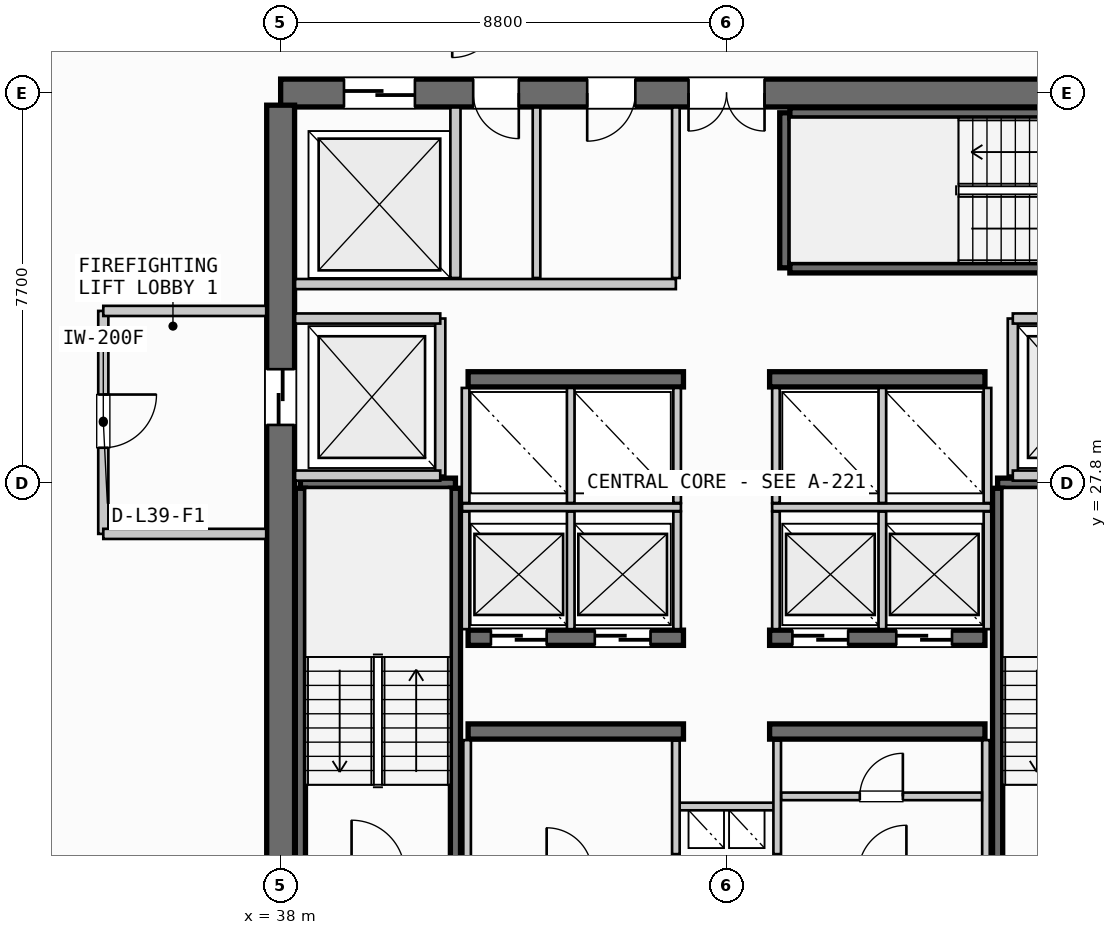
"""IFC4 building model, lengths in metres.
Left out: names, types, materials, properties, quantities, classifications, styles, units other than length and angle.
Written with IfcOpenShell. Run it as: python <this file> out.ifc"""

import sys

from ifc_helpers import new_model, si_unit, direction, frame, frame_2d, origin, place, context, subcontext, project, spatial, rectangle, extrude, source, transform, mapped, element, fill, save


model = new_model("IFC4")
c1 = context("Model", 3, precision=1e-05, world=origin(), true_north=direction((0.0, 1.0)))
c2 = subcontext(c1, "Body", "Model", "MODEL_VIEW")
j1 = project(units=[si_unit("LENGTHUNIT", "METRE"), si_unit("PLANEANGLEUNIT", "RADIAN")], contexts=[c1])
p1 = place(None, origin())
s1 = spatial("IfcSite", under=j1, at=p1, CompositionType="ELEMENT")
p2 = place(p1, origin())
s2 = spatial("IfcBuilding", under=s1, at=p2, CompositionType="ELEMENT")
p3 = place(p2, frame((0.0, 0.0, 153.65)))
s3 = spatial("IfcBuildingStorey", under=s2, at=p3, CompositionType="ELEMENT", Elevation=153.65)
p4 = place(p3, frame((55.6, 35.5, 0.0), z_axis=(0.0, 0.0, 1.0), x_axis=(-1.0, 0.0, 0.0)))
e1 = element("IfcWall", 1, at=p4, inside=s3, PredefinedType="SHEAR", context=c2, shape_type="SweptSolid", body=[
    extrude(rectangle(XDim=17.6, YDim=0.55, at=frame_2d((8.8, 0.0))), origin(), (0.0, 0.0, 1.0), 3.3),
])
p5 = place(p4, frame((8.05, 0.0, 0.0)))
e2 = element("IfcOpeningElement", 2, at=p5, cuts=e1, PredefinedType="OPENING", context=c2, shape_type="SweptSolid", body=[
    extrude(rectangle(XDim=1.5, YDim=2.2, at=frame_2d((0.75, 1.1))), frame((0.0, 0.285, 0.0), z_axis=(0.0, -1.0, 0.0), x_axis=(1.0, 0.0, 0.0)), (0.0, 0.0, 1.0), 0.57),
])
p6 = place(p4, frame((14.95, 0.0, 0.0)))
e3 = element("IfcOpeningElement", 3, at=p6, cuts=e1, PredefinedType="OPENING", context=c2, shape_type="SweptSolid", body=[
    extrude(rectangle(XDim=1.4, YDim=2.3, at=frame_2d((0.7, 1.15))), frame((0.0, 0.285, 0.0), z_axis=(0.0, -1.0, 0.0), x_axis=(1.0, 0.0, 0.0)), (0.0, 0.0, 1.0), 0.57),
])
p7 = place(p4, frame((12.9, 0.0, 0.0)))
e4 = element("IfcOpeningElement", 4, at=p7, cuts=e1, PredefinedType="OPENING", context=c2, shape_type="SweptSolid", body=[
    extrude(rectangle(XDim=0.9, YDim=2.15, at=frame_2d((0.45, 1.075))), frame((0.0, 0.285, 0.0), z_axis=(0.0, -1.0, 0.0), x_axis=(1.0, 0.0, 0.0)), (0.0, 0.0, 1.0), 0.57),
])
p8 = place(p4, frame((10.6, 0.0, 0.0)))
e5 = element("IfcOpeningElement", 5, at=p8, cuts=e1, PredefinedType="OPENING", context=c2, shape_type="SweptSolid", body=[
    extrude(rectangle(XDim=0.95, YDim=2.15, at=frame_2d((0.475, 1.075))), frame((0.0, 0.285, 0.0), z_axis=(0.0, -1.0, 0.0), x_axis=(1.0, 0.0, 0.0)), (0.0, 0.0, 1.0), 0.57),
])
p9 = place(p3, frame((38.0, 35.26, 0.0), z_axis=(0.0, 0.0, 1.0), x_axis=(0.0, -1.0, 0.0)))
e6 = element("IfcWall", 6, at=p9, inside=s3, PredefinedType="SHEAR", context=c2, shape_type="SweptSolid", body=[
    extrude(rectangle(XDim=14.92, YDim=0.55, at=frame_2d((7.46, 0.0))), origin(), (0.0, 0.0, 1.0), 3.3),
])
p10 = place(p9, frame((5.21, 0.0, 0.0)))
e7 = element("IfcOpeningElement", 7, at=p10, cuts=e6, PredefinedType="OPENING", context=c2, shape_type="SweptSolid", body=[
    extrude(rectangle(XDim=1.1, YDim=2.2, at=frame_2d((0.55, 1.1))), frame((0.0, 0.285, 0.0), z_axis=(0.0, -1.0, 0.0), x_axis=(1.0, 0.0, 0.0)), (0.0, 0.0, 1.0), 0.57),
])
for number, where, z_axis, x_axis in (
    (8, (41.7, 22.9, 0.0), (0.0, 0.0, 1.0), (1.0, 0.0, 0.0)),
    (9, (47.65, 22.9, 0.0), (0.0, 0.0, 1.0), (1.0, 0.0, 0.0)),
):
    element("IfcWall", number, at=place(p3, frame(where, z_axis=z_axis, x_axis=x_axis)), inside=s3, PredefinedType="SHEAR", context=c2, shape_type="SweptSolid", body=[
        extrude(rectangle(XDim=4.25, YDim=0.3, at=frame_2d((2.125, 0.0))), origin(), (0.0, 0.0, 1.0), 3.3),
    ])
p11 = place(p3, frame((41.7, 24.75, 0.0), z_axis=(0.0, 0.0, 1.0), x_axis=(1.0, 0.0, 0.0)))
e10 = element("IfcWall", 10, at=p11, inside=s3, PredefinedType="SHEAR", context=c2, shape_type="SweptSolid", body=[
    extrude(rectangle(XDim=4.25, YDim=0.3, at=frame_2d((2.125, 0.0))), origin(), (0.0, 0.0, 1.0), 3.3),
])
p12 = place(p11, frame((0.45, 0.0, 0.0)))
e11 = element("IfcOpeningElement", 11, at=p12, cuts=e10, PredefinedType="OPENING", context=c2, shape_type="SweptSolid", body=[
    extrude(rectangle(XDim=1.1, YDim=2.2, at=frame_2d((0.55, 1.1))), frame((0.0, 0.16, 0.0), z_axis=(0.0, -1.0, 0.0), x_axis=(1.0, 0.0, 0.0)), (0.0, 0.0, 1.0), 0.32),
])
p13 = place(p11, frame((2.5, 0.0, 0.0)))
e12 = element("IfcOpeningElement", 12, at=p13, cuts=e10, PredefinedType="OPENING", context=c2, shape_type="SweptSolid", body=[
    extrude(rectangle(XDim=1.1, YDim=2.2, at=frame_2d((0.55, 1.1))), frame((0.0, 0.16, 0.0), z_axis=(0.0, -1.0, 0.0), x_axis=(1.0, 0.0, 0.0)), (0.0, 0.0, 1.0), 0.32),
])
p14 = place(p3, frame((47.65, 24.75, 0.0), z_axis=(0.0, 0.0, 1.0), x_axis=(1.0, 0.0, 0.0)))
e13 = element("IfcWall", 13, at=p14, inside=s3, PredefinedType="SHEAR", context=c2, shape_type="SweptSolid", body=[
    extrude(rectangle(XDim=4.25, YDim=0.3, at=frame_2d((2.125, 0.0))), origin(), (0.0, 0.0, 1.0), 3.3),
])
p15 = place(p14, frame((0.45, 0.0, 0.0)))
e14 = element("IfcOpeningElement", 14, at=p15, cuts=e13, PredefinedType="OPENING", context=c2, shape_type="SweptSolid", body=[
    extrude(rectangle(XDim=1.1, YDim=2.2, at=frame_2d((0.55, 1.1))), frame((0.0, 0.16, 0.0), z_axis=(0.0, -1.0, 0.0), x_axis=(1.0, 0.0, 0.0)), (0.0, 0.0, 1.0), 0.32),
])
p16 = place(p14, frame((2.5, 0.0, 0.0)))
e15 = element("IfcOpeningElement", 15, at=p16, cuts=e13, PredefinedType="OPENING", context=c2, shape_type="SweptSolid", body=[
    extrude(rectangle(XDim=1.1, YDim=2.2, at=frame_2d((0.55, 1.1))), frame((0.0, 0.16, 0.0), z_axis=(0.0, -1.0, 0.0), x_axis=(1.0, 0.0, 0.0)), (0.0, 0.0, 1.0), 0.32),
])
for number, where, z_axis, x_axis in (
    (16, (41.7, 29.85, 0.0), (0.0, 0.0, 1.0), (1.0, 0.0, 0.0)),
    (17, (47.65, 29.85, 0.0), (0.0, 0.0, 1.0), (1.0, 0.0, 0.0)),
):
    element("IfcWall", number, at=place(p3, frame(where, z_axis=z_axis, x_axis=x_axis)), inside=s3, PredefinedType="SHEAR", context=c2, shape_type="SweptSolid", body=[
        extrude(rectangle(XDim=4.25, YDim=0.3, at=frame_2d((2.125, 0.0))), origin(), (0.0, 0.0, 1.0), 3.3),
    ])
p17 = place(p3, frame((38.39, 27.8, 0.0), z_axis=(0.0, 0.0, 1.0), x_axis=(1.0, 0.0, 0.0)))
e18 = element("IfcWall", 18, at=p17, inside=s3, PredefinedType="SHEAR", context=c2, shape_type="SweptSolid", body=[
    extrude(rectangle(XDim=3.06, YDim=0.2, at=frame_2d((1.53, 0.0))), origin(), (0.0, 0.0, 1.0), 3.3),
])
for number, where, z_axis, x_axis in (
    (19, (41.45, 27.7, 0.0), (0.0, 0.0, 1.0), (0.0, -1.0, 0.0)),
    (20, (38.39, 20.35, 0.0), (0.0, 0.0, 1.0), (0.0, 1.0, 0.0)),
):
    element("IfcWall", number, at=place(p3, frame(where, z_axis=z_axis, x_axis=x_axis)), inside=s3, PredefinedType="SHEAR", context=c2, shape_type="SweptSolid", body=[
        extrude(rectangle(XDim=7.35, YDim=0.2, at=frame_2d((3.675, 0.0))), origin(), (0.0, 0.0, 1.0), 3.3),
    ])
p18 = place(p3, frame((52.15, 27.8, 0.0), z_axis=(0.0, 0.0, 1.0), x_axis=(1.0, 0.0, 0.0)))
e21 = element("IfcWall", 21, at=p18, inside=s3, PredefinedType="SHEAR", context=c2, shape_type="SweptSolid", body=[
    extrude(rectangle(XDim=3.06, YDim=0.2, at=frame_2d((1.53, 0.0))), origin(), (0.0, 0.0, 1.0), 3.3),
])
p19 = place(p3, frame((52.15, 20.35, 0.0), z_axis=(0.0, 0.0, 1.0), x_axis=(0.0, 1.0, 0.0)))
e22 = element("IfcWall", 22, at=p19, inside=s3, PredefinedType="SHEAR", context=c2, shape_type="SweptSolid", body=[
    extrude(rectangle(XDim=7.35, YDim=0.2, at=frame_2d((3.675, 0.0))), origin(), (0.0, 0.0, 1.0), 3.3),
])
p20 = place(p3, frame((47.95, 32.05, 0.0), z_axis=(0.0, 0.0, 1.0), x_axis=(0.0, 1.0, 0.0)))
e23 = element("IfcWall", 23, at=p20, inside=s3, PredefinedType="SHEAR", context=c2, shape_type="SweptSolid", body=[
    extrude(rectangle(XDim=3.06, YDim=0.2, at=frame_2d((1.53, 0.0))), origin(), (0.0, 0.0, 1.0), 3.3),
])
for number, where, z_axis, x_axis in (
    (24, (48.05, 35.11, 0.0), (0.0, 0.0, 1.0), (1.0, 0.0, 0.0)),
    (25, (55.4, 32.05, 0.0), (0.0, 0.0, 1.0), (-1.0, 0.0, 0.0)),
):
    element("IfcWall", number, at=place(p3, frame(where, z_axis=z_axis, x_axis=x_axis)), inside=s3, PredefinedType="SHEAR", context=c2, shape_type="SweptSolid", body=[
        extrude(rectangle(XDim=7.35, YDim=0.2, at=frame_2d((3.675, 0.0))), origin(), (0.0, 0.0, 1.0), 3.3),
    ])
p21 = place(p3, frame((45.8, 21.42, 0.0), z_axis=(0.0, 0.0, 1.0), x_axis=(1.0, 0.0, 0.0)))
e26 = element("IfcWall", 26, at=p21, inside=s3, PredefinedType="PARTITIONING", context=c2, shape_type="SweptSolid", body=[
    extrude(rectangle(XDim=2.0, YDim=0.15, at=frame_2d((1.0, 0.0))), origin(), (0.0, 0.0, 1.0), 2.28),
])
for number, where, z_axis, x_axis in (
    (27, (45.8, 20.48, 0.0), (0.0, 0.0, 1.0), (0.0, 1.0, 0.0)),
    (28, (47.8, 20.48, 0.0), (0.0, 0.0, 1.0), (0.0, 1.0, 0.0)),
):
    element("IfcWall", number, at=place(p3, frame(where, z_axis=z_axis, x_axis=x_axis)), inside=s3, PredefinedType="PARTITIONING", context=c2, shape_type="SweptSolid", body=[
        extrude(rectangle(XDim=2.24, YDim=0.15, at=frame_2d((1.12, 0.0))), origin(), (0.0, 0.0, 1.0), 2.28),
    ])
p22 = place(p3, frame((41.15, 27.95, 0.0), z_axis=(0.0, 0.0, 1.0), x_axis=(0.0, 1.0, 0.0)))
e29 = element("IfcWall", 29, at=p22, inside=s3, PredefinedType="PARTITIONING", context=c2, shape_type="SweptSolid", body=[
    extrude(rectangle(XDim=3.1, YDim=0.2, at=frame_2d((1.55, 0.0))), origin(), (0.0, 0.0, 1.0), 2.28),
])
for number, where, z_axis, x_axis in (
    (30, (38.285, 27.95, 0.0), (0.0, 0.0, 1.0), (1.0, 0.0, 0.0)),
    (31, (38.285, 31.05, 0.0), (0.0, 0.0, 1.0), (1.0, 0.0, 0.0)),
):
    element("IfcWall", number, at=place(p3, frame(where, z_axis=z_axis, x_axis=x_axis)), inside=s3, PredefinedType="PARTITIONING", context=c2, shape_type="SweptSolid", body=[
        extrude(rectangle(XDim=2.865, YDim=0.2, at=frame_2d((1.433, 0.0))), origin(), (0.0, 0.0, 1.0), 2.28),
    ])
p23 = place(p3, frame((34.5, 31.2, 0.0), z_axis=(0.0, 0.0, 1.0), x_axis=(0.0, -1.0, 0.0)))
e32 = element("IfcWall", 32, at=p23, inside=s3, PredefinedType="PARTITIONING", context=c2, shape_type="SweptSolid", body=[
    extrude(rectangle(XDim=4.4, YDim=0.2, at=frame_2d((2.2, 0.0))), origin(), (0.0, 0.0, 1.0), 2.28),
])
p24 = place(p23, frame((1.65, 0.0, 0.0)))
e33 = element("IfcOpeningElement", 33, at=p24, cuts=e32, PredefinedType="OPENING", context=c2, shape_type="SweptSolid", body=[
    extrude(rectangle(XDim=1.05, YDim=2.15, at=frame_2d((0.525, 1.075))), frame((0.0, 0.11, 0.0), z_axis=(0.0, -1.0, 0.0), x_axis=(1.0, 0.0, 0.0)), (0.0, 0.0, 1.0), 0.22),
])
for number, where, z_axis, x_axis in (
    (34, (34.5, 26.8, 0.0), (0.0, 0.0, 1.0), (1.0, 0.0, 0.0)),
    (35, (34.5, 31.2, 0.0), (0.0, 0.0, 1.0), (1.0, 0.0, 0.0)),
):
    element("IfcWall", number, at=place(p3, frame(where, z_axis=z_axis, x_axis=x_axis)), inside=s3, PredefinedType="PARTITIONING", context=c2, shape_type="SweptSolid", body=[
        extrude(rectangle(XDim=3.215, YDim=0.2, at=frame_2d((1.607, 0.0))), origin(), (0.0, 0.0, 1.0), 2.28),
    ])
p25 = place(p3, frame((52.45, 27.95, 0.0), z_axis=(0.0, 0.0, 1.0), x_axis=(0.0, 1.0, 0.0)))
e36 = element("IfcWall", 36, at=p25, inside=s3, PredefinedType="PARTITIONING", context=c2, shape_type="SweptSolid", body=[
    extrude(rectangle(XDim=3.1, YDim=0.2, at=frame_2d((1.55, 0.0))), origin(), (0.0, 0.0, 1.0), 2.28),
])
for number, where, z_axis, x_axis in (
    (37, (52.45, 27.95, 0.0), (0.0, 0.0, 1.0), (1.0, 0.0, 0.0)),
    (38, (52.45, 31.05, 0.0), (0.0, 0.0, 1.0), (1.0, 0.0, 0.0)),
):
    element("IfcWall", number, at=place(p3, frame(where, z_axis=z_axis, x_axis=x_axis)), inside=s3, PredefinedType="PARTITIONING", context=c2, shape_type="SweptSolid", body=[
        extrude(rectangle(XDim=2.865, YDim=0.2, at=frame_2d((1.433, 0.0))), origin(), (0.0, 0.0, 1.0), 2.28),
    ])
for number, where, z_axis, x_axis in (
    (39, (41.68, 20.385, 0.0), (0.0, 0.0, 1.0), (0.0, 1.0, 0.0)),
    (40, (51.92, 20.385, 0.0), (0.0, 0.0, 1.0), (0.0, 1.0, 0.0)),
):
    element("IfcWall", number, at=place(p3, frame(where, z_axis=z_axis, x_axis=x_axis)), inside=s3, PredefinedType="PARTITIONING", context=c2, shape_type="SweptSolid", body=[
        extrude(rectangle(XDim=2.345, YDim=0.15, at=frame_2d((1.172, 0.0))), origin(), (0.0, 0.0, 1.0), 2.28),
    ])
p26 = place(p3, frame((47.88, 21.62, 0.0), z_axis=(0.0, 0.0, 1.0), x_axis=(1.0, 0.0, 0.0)))
e41 = element("IfcWall", 41, at=p26, inside=s3, PredefinedType="PARTITIONING", context=c2, shape_type="SweptSolid", body=[
    extrude(rectangle(XDim=3.96, YDim=0.15, at=frame_2d((1.98, 0.0))), origin(), (0.0, 0.0, 1.0), 2.28),
])
p27 = place(p26, frame((1.55, 0.0, 0.0)))
e42 = element("IfcOpeningElement", 42, at=p27, cuts=e41, PredefinedType="OPENING", context=c2, shape_type="SweptSolid", body=[
    extrude(rectangle(XDim=0.85, YDim=2.15, at=frame_2d((0.425, 1.075))), frame((0.0, 0.085, 0.0), z_axis=(0.0, -1.0, 0.0), x_axis=(1.0, 0.0, 0.0)), (0.0, 0.0, 1.0), 0.17),
])
p28 = place(p3, frame((41.58, 27.325, 0.0), z_axis=(0.0, 0.0, 1.0), x_axis=(1.0, 0.0, 0.0)))
e43 = element("IfcWall", 43, at=p28, inside=s3, PredefinedType="PARTITIONING", context=c2, shape_type="SweptSolid", body=[
    extrude(rectangle(XDim=4.32, YDim=0.15, at=frame_2d((2.16, 0.0))), origin(), (0.0, 0.0, 1.0), 2.28),
])
p29 = place(p3, frame((47.7, 27.325, 0.0), z_axis=(0.0, 0.0, 1.0), x_axis=(1.0, 0.0, 0.0)))
e44 = element("IfcWall", 44, at=p29, inside=s3, PredefinedType="PARTITIONING", context=c2, shape_type="SweptSolid", body=[
    extrude(rectangle(XDim=4.32, YDim=0.15, at=frame_2d((2.16, 0.0))), origin(), (0.0, 0.0, 1.0), 2.28),
])
for number, where, z_axis, x_axis in (
    (45, (41.65, 24.92, 0.0), (0.0, 0.0, 1.0), (0.0, 1.0, 0.0)),
    (46, (43.725, 24.92, 0.0), (0.0, 0.0, 1.0), (0.0, 1.0, 0.0)),
    (47, (45.825, 24.92, 0.0), (0.0, 0.0, 1.0), (0.0, 1.0, 0.0)),
    (48, (47.775, 24.92, 0.0), (0.0, 0.0, 1.0), (0.0, 1.0, 0.0)),
    (49, (49.875, 24.92, 0.0), (0.0, 0.0, 1.0), (0.0, 1.0, 0.0)),
    (50, (51.95, 24.92, 0.0), (0.0, 0.0, 1.0), (0.0, 1.0, 0.0)),
):
    element("IfcWall", number, at=place(p3, frame(where, z_axis=z_axis, x_axis=x_axis)), inside=s3, PredefinedType="PARTITIONING", context=c2, shape_type="SweptSolid", body=[
        extrude(rectangle(XDim=2.32, YDim=0.15, at=frame_2d((1.16, 0.0))), origin(), (0.0, 0.0, 1.0), 2.28),
    ])
for number, where, z_axis, x_axis in (
    (51, (41.65, 27.41, 0.0), (0.0, 0.0, 1.0), (0.0, 1.0, 0.0)),
    (52, (43.725, 27.41, 0.0), (0.0, 0.0, 1.0), (0.0, 1.0, 0.0)),
    (53, (45.825, 27.41, 0.0), (0.0, 0.0, 1.0), (0.0, 1.0, 0.0)),
    (54, (47.775, 27.41, 0.0), (0.0, 0.0, 1.0), (0.0, 1.0, 0.0)),
    (55, (49.875, 27.41, 0.0), (0.0, 0.0, 1.0), (0.0, 1.0, 0.0)),
    (56, (51.95, 27.41, 0.0), (0.0, 0.0, 1.0), (0.0, 1.0, 0.0)),
):
    element("IfcWall", number, at=place(p3, frame(where, z_axis=z_axis, x_axis=x_axis)), inside=s3, PredefinedType="PARTITIONING", context=c2, shape_type="SweptSolid", body=[
        extrude(rectangle(XDim=2.27, YDim=0.15, at=frame_2d((1.135, 0.0))), origin(), (0.0, 0.0, 1.0), 2.28),
    ])
p30 = place(p3, frame((41.45, 31.85, 0.0), z_axis=(0.0, 0.0, 1.0), x_axis=(0.0, 1.0, 0.0)))
e57 = element("IfcWall", 57, at=p30, inside=s3, PredefinedType="PARTITIONING", context=c2, shape_type="SweptSolid", body=[
    extrude(rectangle(XDim=3.365, YDim=0.2, at=frame_2d((1.683, 0.0))), origin(), (0.0, 0.0, 1.0), 2.28),
])
p31 = place(p3, frame((38.285, 31.73, 0.0), z_axis=(0.0, 0.0, 1.0), x_axis=(1.0, 0.0, 0.0)))
e58 = element("IfcWall", 58, at=p31, inside=s3, PredefinedType="PARTITIONING", context=c2, shape_type="SweptSolid", body=[
    extrude(rectangle(XDim=7.515, YDim=0.2, at=frame_2d((3.758, 0.0))), origin(), (0.0, 0.0, 1.0), 2.28),
])
p32 = place(p3, frame((45.8, 31.85, 0.0), z_axis=(0.0, 0.0, 1.0), x_axis=(0.0, 1.0, 0.0)))
e59 = element("IfcWall", 59, at=p32, inside=s3, PredefinedType="PARTITIONING", context=c2, shape_type="SweptSolid", body=[
    extrude(rectangle(XDim=3.365, YDim=0.15, at=frame_2d((1.683, 0.0))), origin(), (0.0, 0.0, 1.0), 2.28),
])
p33 = place(p3, frame((43.05, 31.85, 0.0), z_axis=(0.0, 0.0, 1.0), x_axis=(0.0, 1.0, 0.0)))
e60 = element("IfcWall", 60, at=p33, inside=s3, PredefinedType="PLUMBINGWALL", context=c2, shape_type="SweptSolid", body=[
    extrude(rectangle(XDim=3.365, YDim=0.15, at=frame_2d((1.683, 0.0))), origin(), (0.0, 0.0, 1.0), 2.28),
])
m1 = source(origin(), c2, "Body", "SweptSolid", [
    extrude(rectangle(XDim=1.5, YDim=2.2, at=frame_2d((0.75, 1.1))), frame((0.0, 0.025, 0.0), z_axis=(0.0, -1.0, 0.0), x_axis=(1.0, 0.0, 0.0)), (0.0, 0.0, 1.0), 0.05),
])
p34 = place(p5, origin())
e61 = element("IfcDoor", 61, at=p34, inside=s3, OperationType="DOUBLE_DOOR_SINGLE_SWING", PredefinedType="DOOR", context=c2, shape_type="MappedRepresentation", body=[
    mapped(m1, transform((0.0, 0.0, 0.0), scale=1.0)),
])
fill(e2, e61)
m2 = source(origin(), c2, "Body", "SweptSolid", [
    extrude(rectangle(XDim=1.1, YDim=2.2, at=frame_2d((0.55, 1.1))), frame((0.0, 0.025, 0.0), z_axis=(0.0, -1.0, 0.0), x_axis=(1.0, 0.0, 0.0)), (0.0, 0.0, 1.0), 0.05),
])
p35 = place(p10, origin())
e62 = element("IfcDoor", 62, at=p35, inside=s3, OperationType="SLIDING_TO_LEFT", PredefinedType="DOOR", context=c2, shape_type="MappedRepresentation", body=[
    mapped(m2, transform((0.0, 0.0, 0.0), scale=1.0)),
])
fill(e7, e62)
p36 = place(p12, origin())
e63 = element("IfcDoor", 63, at=p36, inside=s3, OperationType="SLIDING_TO_RIGHT", PredefinedType="DOOR", context=c2, shape_type="MappedRepresentation", body=[
    mapped(m2, transform((0.0, 0.0, 0.0), scale=1.0)),
])
fill(e11, e63)
p37 = place(p13, origin())
e64 = element("IfcDoor", 64, at=p37, inside=s3, OperationType="SLIDING_TO_RIGHT", PredefinedType="DOOR", context=c2, shape_type="MappedRepresentation", body=[
    mapped(m2, transform((0.0, 0.0, 0.0), scale=1.0)),
])
fill(e12, e64)
p38 = place(p15, origin())
e65 = element("IfcDoor", 65, at=p38, inside=s3, OperationType="SLIDING_TO_RIGHT", PredefinedType="DOOR", context=c2, shape_type="MappedRepresentation", body=[
    mapped(m2, transform((0.0, 0.0, 0.0), scale=1.0)),
])
fill(e14, e65)
p39 = place(p16, origin())
e66 = element("IfcDoor", 66, at=p39, inside=s3, OperationType="SLIDING_TO_RIGHT", PredefinedType="DOOR", context=c2, shape_type="MappedRepresentation", body=[
    mapped(m2, transform((0.0, 0.0, 0.0), scale=1.0)),
])
fill(e15, e66)
m3 = source(origin(), c2, "Body", "SweptSolid", [
    extrude(rectangle(XDim=1.4, YDim=2.3, at=frame_2d((0.7, 1.15))), frame((0.0, 0.025, 0.0), z_axis=(0.0, -1.0, 0.0), x_axis=(1.0, 0.0, 0.0)), (0.0, 0.0, 1.0), 0.05),
])
p40 = place(p6, origin())
e67 = element("IfcDoor", 67, at=p40, inside=s3, OperationType="SLIDING_TO_RIGHT", PredefinedType="DOOR", context=c2, shape_type="MappedRepresentation", body=[
    mapped(m3, transform((0.0, 0.0, 0.0), scale=1.0)),
])
fill(e3, e67)
m4 = source(origin(), c2, "Body", "SweptSolid", [
    extrude(rectangle(XDim=0.9, YDim=2.15, at=frame_2d((0.45, 1.075))), frame((0.0, 0.025, 0.0), z_axis=(0.0, -1.0, 0.0), x_axis=(1.0, 0.0, 0.0)), (0.0, 0.0, 1.0), 0.05),
])
p41 = place(p7, origin())
e68 = element("IfcDoor", 68, at=p41, inside=s3, OperationType="SINGLE_SWING_LEFT", PredefinedType="DOOR", context=c2, shape_type="MappedRepresentation", body=[
    mapped(m4, transform((0.0, 0.0, 0.0), scale=1.0)),
])
fill(e4, e68)
m5 = source(origin(), c2, "Body", "SweptSolid", [
    extrude(rectangle(XDim=0.95, YDim=2.15, at=frame_2d((0.475, 1.075))), frame((0.0, 0.025, 0.0), z_axis=(0.0, -1.0, 0.0), x_axis=(1.0, 0.0, 0.0)), (0.0, 0.0, 1.0), 0.05),
])
p42 = place(p8, origin())
e69 = element("IfcDoor", 69, at=p42, inside=s3, OperationType="SINGLE_SWING_RIGHT", PredefinedType="DOOR", context=c2, shape_type="MappedRepresentation", body=[
    mapped(m5, transform((0.0, 0.0, 0.0), scale=1.0)),
])
fill(e5, e69)
m6 = source(origin(), c2, "Body", "SweptSolid", [
    extrude(rectangle(XDim=1.05, YDim=2.15, at=frame_2d((0.525, 1.075))), frame((0.0, 0.025, 0.0), z_axis=(0.0, -1.0, 0.0), x_axis=(1.0, 0.0, 0.0)), (0.0, 0.0, 1.0), 0.05),
])
p43 = place(p24, origin())
e70 = element("IfcDoor", 70, at=p43, inside=s3, OperationType="SINGLE_SWING_LEFT", PredefinedType="DOOR", context=c2, shape_type="MappedRepresentation", body=[
    mapped(m6, transform((0.0, 0.0, 0.0), scale=1.0)),
])
fill(e33, e70)
m7 = source(origin(), c2, "Body", "SweptSolid", [
    extrude(rectangle(XDim=0.85, YDim=2.15, at=frame_2d((0.425, 1.075))), frame((0.0, 0.025, 0.0), z_axis=(0.0, -1.0, 0.0), x_axis=(1.0, 0.0, 0.0)), (0.0, 0.0, 1.0), 0.05),
])
p44 = place(p27, origin())
e71 = element("IfcDoor", 71, at=p44, inside=s3, OperationType="SINGLE_SWING_RIGHT", PredefinedType="DOOR", context=c2, shape_type="MappedRepresentation", body=[
    mapped(m7, transform((0.0, 0.0, 0.0), scale=1.0)),
])
fill(e42, e71)
save(model, sys.argv[1])
